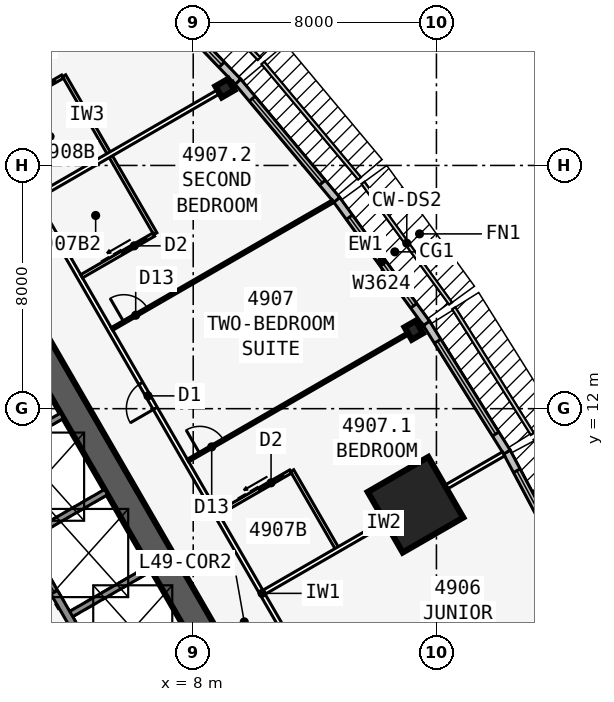
"""IFC4 building model, lengths in metres.
Left out: names, types, materials, properties, quantities, classifications, styles, units other than length and angle.
Written with IfcOpenShell. Run it as: python <this file> out.ifc"""

import sys

from ifc_helpers import new_model, si_unit, direction, frame, frame_2d, origin, origin_2d, place, context, subcontext, project, spatial, rectangle, i_section, extrude, element, fill, save


model = new_model("IFC4")
c1 = context("Model", 3, precision=1e-05, world=origin(), true_north=direction((0.0, 1.0)))
c2 = subcontext(c1, "Body", "Model", "MODEL_VIEW")
j1 = project(units=[si_unit("LENGTHUNIT", "METRE"), si_unit("PLANEANGLEUNIT", "RADIAN")], contexts=[c1])
p1 = place(None, origin())
s1 = spatial("IfcSite", under=j1, at=p1, CompositionType="ELEMENT")
p2 = place(p1, origin())
s2 = spatial("IfcBuilding", under=s1, at=p2, CompositionType="ELEMENT")
p3 = place(p2, frame((0.0, 0.0, 182.7)))
s3 = spatial("IfcBuildingStorey", under=s2, at=p3, CompositionType="ELEMENT", Elevation=182.7)
p4 = place(p3, frame((16.5, -9.526, 0.0), z_axis=(0.0, 0.0, 1.0), x_axis=(-0.499999749417, 0.866025548458, 0.0)))
e1 = element("IfcWall", 1, at=p4, inside=s3, PredefinedType="SHEAR", context=c2, shape_type="SweptSolid", body=[
    extrude(rectangle(XDim=33.0, YDim=0.9, at=frame_2d((16.5, 0.0))), origin(), (0.0, 0.0, 1.0), 3.4),
])
p5 = place(p4, frame((14.15, 0.0, 0.0)))
e2 = element("IfcOpeningElement", 2, at=p5, cuts=e1, PredefinedType="OPENING", context=c2, shape_type="SweptSolid", body=[
    extrude(rectangle(XDim=1.8, YDim=2.13, at=frame_2d((0.9, 1.065))), frame((0.0, 0.46, 0.0), z_axis=(0.0, -1.0, 0.0), x_axis=(1.0, 0.0, 0.0)), (0.0, 0.0, 1.0), 0.92),
])
p6 = place(p4, frame((12.6, 0.0, 0.0)))
e3 = element("IfcOpeningElement", 3, at=p6, cuts=e1, PredefinedType="OPENING", context=c2, shape_type="SweptSolid", body=[
    extrude(rectangle(XDim=1.0, YDim=2.13, at=frame_2d((0.5, 1.065))), frame((0.0, 0.46, 0.0), z_axis=(0.0, -1.0, 0.0), x_axis=(1.0, 0.0, 0.0)), (0.0, 0.0, 1.0), 0.92),
])
p7 = place(p3, frame((5.379, 2.586, 0.0), z_axis=(0.0, 0.0, 1.0), x_axis=(-0.500001375892, 0.866024609411, 0.0)))
e4 = element("IfcWall", 4, at=p7, inside=s3, PredefinedType="SOLIDWALL", context=c2, shape_type="SweptSolid", body=[
    extrude(rectangle(XDim=10.633, YDim=0.25, at=frame_2d((5.316, 0.0))), origin(), (0.0, 0.0, 1.0), 3.235),
])
p8 = place(p7, frame((9.164, 0.0, 0.0)))
e5 = element("IfcOpeningElement", 5, at=p8, cuts=e4, PredefinedType="OPENING", context=c2, shape_type="SweptSolid", body=[
    extrude(rectangle(XDim=0.9, YDim=2.13, at=frame_2d((0.45, 1.065))), frame((0.0, 0.135, 0.0), z_axis=(0.0, -1.0, 0.0), x_axis=(1.0, 0.0, 0.0)), (0.0, 0.0, 1.0), 0.27),
])
p9 = place(p7, frame((1.0, 0.0, 0.0)))
e6 = element("IfcOpeningElement", 6, at=p9, cuts=e4, PredefinedType="OPENING", context=c2, shape_type="SweptSolid", body=[
    extrude(rectangle(XDim=1.1, YDim=2.13, at=frame_2d((0.55, 1.065))), frame((0.0, 0.135, 0.0), z_axis=(0.0, -1.0, 0.0), x_axis=(1.0, 0.0, 0.0)), (0.0, 0.0, 1.0), 0.27),
])
p10 = place(p7, frame((3.9, 0.0, 0.0)))
e7 = element("IfcOpeningElement", 7, at=p10, cuts=e4, PredefinedType="OPENING", context=c2, shape_type="SweptSolid", body=[
    extrude(rectangle(XDim=1.1, YDim=2.13, at=frame_2d((0.55, 1.065))), frame((0.0, 0.135, 0.0), z_axis=(0.0, -1.0, 0.0), x_axis=(1.0, 0.0, 0.0)), (0.0, 0.0, 1.0), 0.27),
])
p11 = place(p7, frame((6.8, 0.0, 0.0)))
e8 = element("IfcOpeningElement", 8, at=p11, cuts=e4, PredefinedType="OPENING", context=c2, shape_type="SweptSolid", body=[
    extrude(rectangle(XDim=1.1, YDim=2.13, at=frame_2d((0.55, 1.065))), frame((0.0, 0.135, 0.0), z_axis=(0.0, -1.0, 0.0), x_axis=(1.0, 0.0, 0.0)), (0.0, 0.0, 1.0), 0.27),
])
for number, where, z_axis, x_axis in (
    (9, (3.879, 5.184, 0.0), (0.0, 0.0, 1.0), (0.866, 0.5, 0.0)),
    (10, (2.429, 7.696, 0.0), (0.0, 0.0, 1.0), (0.866, 0.5, 0.0)),
    (11, (0.979, 10.207, 0.0), (0.0, 0.0, 1.0), (0.866, 0.5, 0.0)),
):
    element("IfcWall", number, at=place(p3, frame(where, z_axis=z_axis, x_axis=x_axis)), inside=s3, PredefinedType="SOLIDWALL", context=c2, shape_type="SweptSolid", body=[
        extrude(rectangle(XDim=3.125, YDim=0.2, at=frame_2d((1.562, 0.0))), origin(), (0.0, 0.0, 1.0), 3.235),
    ])
for number, where, z_axis, x_axis in (
    (12, (15.254, 14.58, 0.0), (0.0, 0.0, 1.0), (0.866, 0.5, 0.0)),
    (13, (9.041, 22.541, 0.0), (0.0, 0.0, 1.0), (-0.5, 0.866, 0.0)),
):
    element("IfcColumn", number, at=place(p3, frame(where, z_axis=z_axis, x_axis=x_axis)), inside=s3, PredefinedType="COLUMN", context=c2, shape_type="SweptSolid", body=[
        extrude(i_section(OverallWidth=0.424, OverallDepth=0.475, WebThickness=0.048, FlangeThickness=0.077, at=origin_2d()), origin(), (0.0, 0.0, 1.0), 3.4),
    ])
p12 = place(p3, frame((15.312, 8.84, 0.0), z_axis=(0.0, 0.0, 1.0), x_axis=(0.866025403784, 0.5, 0.0)))
e14 = element("IfcColumn", 14, at=p12, inside=s3, PredefinedType="COLUMN", context=c2, shape_type="SweptSolid", body=[
    extrude(rectangle(XDim=2.3, YDim=2.3, at=origin_2d()), origin(), (0.0, 0.0, 1.0), 3.4),
])
p13 = place(p3, frame((20.663, 6.161, 0.0), z_axis=(0.0, 0.0, 1.0), x_axis=(-0.469404966864, 0.882982999317, 0.0)))
e15 = element("IfcWall", 15, at=p13, inside=s3, PredefinedType="STANDARD", context=c2, shape_type="SweptSolid", body=[
    extrude(rectangle(XDim=5.003, YDim=0.25, at=frame_2d((2.501, 0.0))), origin(), (0.0, 0.0, 1.0), 3.235),
])
p14 = place(p13, frame((0.701, 0.0, 0.45)))
e16 = element("IfcOpeningElement", 16, at=p14, cuts=e15, PredefinedType="OPENING", context=c2, shape_type="SweptSolid", body=[
    extrude(rectangle(XDim=3.6, YDim=2.4, at=frame_2d((1.8, 1.2))), frame((0.0, 0.135, 0.0), z_axis=(0.0, -1.0, 0.0), x_axis=(1.0, 0.0, 0.0)), (0.0, 0.0, 1.0), 0.27),
])
p15 = place(p3, frame((18.319, 10.571, 0.0), z_axis=(0.0, 0.0, 1.0), x_axis=(-0.529990167382, 0.84800378683, 0.0)))
e17 = element("IfcWall", 17, at=p15, inside=s3, PredefinedType="STANDARD", context=c2, shape_type="SweptSolid", body=[
    extrude(rectangle(XDim=5.003, YDim=0.25, at=frame_2d((2.501, 0.0))), origin(), (0.0, 0.0, 1.0), 3.235),
])
p16 = place(p15, frame((0.701, 0.0, 0.45)))
e18 = element("IfcOpeningElement", 18, at=p16, cuts=e17, PredefinedType="OPENING", context=c2, shape_type="SweptSolid", body=[
    extrude(rectangle(XDim=3.6, YDim=2.4, at=frame_2d((1.8, 1.2))), frame((0.0, 0.135, 0.0), z_axis=(0.0, -1.0, 0.0), x_axis=(1.0, 0.0, 0.0)), (0.0, 0.0, 1.0), 0.27),
])
p17 = place(p3, frame((15.672, 14.807, 0.0), z_axis=(0.0, 0.0, 1.0), x_axis=(-0.587669188412, 0.809101307001, 0.0)))
e19 = element("IfcWall", 19, at=p17, inside=s3, PredefinedType="STANDARD", context=c2, shape_type="SweptSolid", body=[
    extrude(rectangle(XDim=5.028, YDim=0.25, at=frame_2d((2.514, 0.0))), origin(), (0.0, 0.0, 1.0), 3.235),
])
p18 = place(p17, frame((0.714, 0.0, 0.45)))
e20 = element("IfcOpeningElement", 20, at=p18, cuts=e19, PredefinedType="OPENING", context=c2, shape_type="SweptSolid", body=[
    extrude(rectangle(XDim=3.6, YDim=2.4, at=frame_2d((1.8, 1.2))), frame((0.0, 0.135, 0.0), z_axis=(0.0, -1.0, 0.0), x_axis=(1.0, 0.0, 0.0)), (0.0, 0.0, 1.0), 0.27),
])
p19 = place(p3, frame((12.723, 18.868, 0.0), z_axis=(0.0, 0.0, 1.0), x_axis=(-0.641810386606, 0.766863369607, 0.0)))
e21 = element("IfcWall", 21, at=p19, inside=s3, PredefinedType="STANDARD", context=c2, shape_type="SweptSolid", body=[
    extrude(rectangle(XDim=5.076, YDim=0.25, at=frame_2d((2.538, 0.0))), origin(), (0.0, 0.0, 1.0), 3.235),
])
p20 = place(p19, frame((0.738, 0.0, 0.45)))
e22 = element("IfcOpeningElement", 22, at=p20, cuts=e21, PredefinedType="OPENING", context=c2, shape_type="SweptSolid", body=[
    extrude(rectangle(XDim=3.6, YDim=2.4, at=frame_2d((1.8, 1.2))), frame((0.0, 0.135, 0.0), z_axis=(0.0, -1.0, 0.0), x_axis=(1.0, 0.0, 0.0)), (0.0, 0.0, 1.0), 0.27),
])
p21 = place(p3, frame((9.471, 22.754, 0.0), z_axis=(0.0, 0.0, 1.0), x_axis=(-0.691719937936, 0.722165858693, 0.0)))
e23 = element("IfcWall", 23, at=p21, inside=s3, PredefinedType="STANDARD", context=c2, shape_type="SweptSolid", body=[
    extrude(rectangle(XDim=5.148, YDim=0.25, at=frame_2d((2.574, 0.0))), origin(), (0.0, 0.0, 1.0), 3.235),
])
p22 = place(p21, frame((0.774, 0.0, 0.45)))
e24 = element("IfcOpeningElement", 24, at=p22, cuts=e23, PredefinedType="OPENING", context=c2, shape_type="SweptSolid", body=[
    extrude(rectangle(XDim=3.6, YDim=2.4, at=frame_2d((1.8, 1.2))), frame((0.0, 0.135, 0.0), z_axis=(0.0, -1.0, 0.0), x_axis=(1.0, 0.0, 0.0)), (0.0, 0.0, 1.0), 0.27),
])
p23 = place(p3, frame((20.027, -10.985, 0.0), z_axis=(0.0, 0.0, 1.0), x_axis=(-0.500001677587, 0.866024435227, 0.0)))
e25 = element("IfcWall", 25, at=p23, inside=s3, PredefinedType="PARTITIONING", context=c2, shape_type="SweptSolid", body=[
    extrude(rectangle(XDim=39.054, YDim=0.15, at=frame_2d((19.527, 0.0))), origin(), (0.0, 0.0, 1.0), 3.235),
])
p24 = place(p23, frame((1.558, 0.0, 0.0)))
e26 = element("IfcOpeningElement", 26, at=p24, cuts=e25, PredefinedType="OPENING", context=c2, shape_type="SweptSolid", body=[
    extrude(rectangle(XDim=0.95, YDim=2.13, at=frame_2d((0.475, 1.065))), frame((0.0, 0.085, 0.0), z_axis=(0.0, -1.0, 0.0), x_axis=(1.0, 0.0, 0.0)), (0.0, 0.0, 1.0), 0.17),
])
p25 = place(p23, frame((12.752, 0.0, 0.0)))
e27 = element("IfcOpeningElement", 27, at=p25, cuts=e25, PredefinedType="OPENING", context=c2, shape_type="SweptSolid", body=[
    extrude(rectangle(XDim=0.95, YDim=2.13, at=frame_2d((0.475, 1.065))), frame((0.0, 0.085, 0.0), z_axis=(0.0, -1.0, 0.0), x_axis=(1.0, 0.0, 0.0)), (0.0, 0.0, 1.0), 0.17),
])
p26 = place(p23, frame((26.552, 0.0, 0.0)))
e28 = element("IfcOpeningElement", 28, at=p26, cuts=e25, PredefinedType="OPENING", context=c2, shape_type="SweptSolid", body=[
    extrude(rectangle(XDim=0.95, YDim=2.13, at=frame_2d((0.475, 1.065))), frame((0.0, 0.085, 0.0), z_axis=(0.0, -1.0, 0.0), x_axis=(1.0, 0.0, 0.0)), (0.0, 0.0, 1.0), 0.17),
])
p27 = place(p23, frame((37.752, 0.0, 0.0)))
e29 = element("IfcOpeningElement", 29, at=p27, cuts=e25, PredefinedType="OPENING", context=c2, shape_type="SweptSolid", body=[
    extrude(rectangle(XDim=0.95, YDim=2.13, at=frame_2d((0.475, 1.065))), frame((0.0, 0.085, 0.0), z_axis=(0.0, -1.0, 0.0), x_axis=(1.0, 0.0, 0.0)), (0.0, 0.0, 1.0), 0.17),
])
p28 = place(p3, frame((10.329, 5.963, 0.0), z_axis=(0.0, 0.0, 1.0), x_axis=(0.866025170687, 0.500000403736, 0.0)))
e30 = element("IfcWall", 30, at=p28, inside=s3, PredefinedType="PARTITIONING", context=c2, shape_type="SweptSolid", body=[
    extrude(rectangle(XDim=9.099, YDim=0.15, at=frame_2d((4.549, 0.0))), origin(), (0.0, 0.0, 1.0), 2.389),
])
p29 = place(p3, frame((7.829, 10.293, 0.0), z_axis=(0.0, 0.0, 1.0), x_axis=(0.866027015393, 0.499997208602, 0.0)))
e31 = element("IfcWall", 31, at=p29, inside=s3, PredefinedType="PARTITIONING", context=c2, shape_type="SweptSolid", body=[
    extrude(rectangle(XDim=8.922, YDim=0.1, at=frame_2d((4.461, 0.0))), origin(), (0.0, 0.0, 1.0), 2.389),
])
p30 = place(p29, frame((0.45, 0.0, 0.0)))
e32 = element("IfcOpeningElement", 32, at=p30, cuts=e31, PredefinedType="OPENING", context=c2, shape_type="SweptSolid", body=[
    extrude(rectangle(XDim=0.9, YDim=2.13, at=frame_2d((0.45, 1.065))), frame((0.0, 0.06, 0.0), z_axis=(0.0, -1.0, 0.0), x_axis=(1.0, 0.0, 0.0)), (0.0, 0.0, 1.0), 0.12),
])
p31 = place(p3, frame((5.329, 14.623, 0.0), z_axis=(0.0, 0.0, 1.0), x_axis=(0.866011723728, 0.500023693804, 0.0)))
e33 = element("IfcWall", 33, at=p31, inside=s3, PredefinedType="PARTITIONING", context=c2, shape_type="SweptSolid", body=[
    extrude(rectangle(XDim=8.395, YDim=0.1, at=frame_2d((4.198, 0.0))), origin(), (0.0, 0.0, 1.0), 2.389),
])
p32 = place(p31, frame((0.45, 0.0, 0.0)))
e34 = element("IfcOpeningElement", 34, at=p32, cuts=e33, PredefinedType="OPENING", context=c2, shape_type="SweptSolid", body=[
    extrude(rectangle(XDim=0.9, YDim=2.13, at=frame_2d((0.45, 1.065))), frame((0.0, 0.06, 0.0), z_axis=(0.0, -1.0, 0.0), x_axis=(1.0, 0.0, 0.0)), (0.0, 0.0, 1.0), 0.12),
])
p33 = place(p3, frame((2.829, 18.954, 0.0), z_axis=(0.0, 0.0, 1.0), x_axis=(0.866015739374, 0.500016738876, 0.0)))
e35 = element("IfcWall", 35, at=p33, inside=s3, PredefinedType="PARTITIONING", context=c2, shape_type="SweptSolid", body=[
    extrude(rectangle(XDim=7.516, YDim=0.15, at=frame_2d((3.758, 0.0))), origin(), (0.0, 0.0, 1.0), 2.389),
])
p34 = place(p3, frame((12.753, 7.363, 0.0), z_axis=(0.0, 0.0, 1.0), x_axis=(-0.499990139034, 0.866031096941, 0.0)))
e36 = element("IfcWall", 36, at=p34, inside=s3, PredefinedType="PLUMBINGWALL", context=c2, shape_type="SweptSolid", body=[
    extrude(rectangle(XDim=3.0, YDim=0.12, at=frame_2d((1.5, 0.0))), origin(), (0.0, 0.0, 1.0), 3.235),
])
p35 = place(p3, frame((8.829, 8.561, 0.0), z_axis=(0.0, 0.0, 1.0), x_axis=(0.866035715982, 0.499982138324, 0.0)))
e37 = element("IfcWall", 37, at=p35, inside=s3, PredefinedType="PLUMBINGWALL", context=c2, shape_type="SweptSolid", body=[
    extrude(rectangle(XDim=2.74, YDim=0.12, at=frame_2d((1.37, 0.0))), origin(), (0.0, 0.0, 1.0), 3.235),
])
p36 = place(p35, frame((1.55, 0.0, 0.0)))
e38 = element("IfcOpeningElement", 38, at=p36, cuts=e37, PredefinedType="OPENING", context=c2, shape_type="SweptSolid", body=[
    extrude(rectangle(XDim=0.9, YDim=2.13, at=frame_2d((0.45, 1.065))), frame((0.0, 0.07, 0.0), z_axis=(0.0, -1.0, 0.0), x_axis=(1.0, 0.0, 0.0)), (0.0, 0.0, 1.0), 0.14),
])
p37 = place(p3, frame((6.753, 17.755, 0.0), z_axis=(0.0, 0.0, 1.0), x_axis=(-0.499990139034, 0.866031096941, 0.0)))
e39 = element("IfcWall", 39, at=p37, inside=s3, PredefinedType="PLUMBINGWALL", context=c2, shape_type="SweptSolid", body=[
    extrude(rectangle(XDim=3.0, YDim=0.12, at=frame_2d((1.5, 0.0))), origin(), (0.0, 0.0, 1.0), 3.235),
])
p38 = place(p3, frame((4.329, 16.355, 0.0), z_axis=(0.0, 0.0, 1.0), x_axis=(0.866035715982, 0.499982138324, 0.0)))
e40 = element("IfcWall", 40, at=p38, inside=s3, PredefinedType="PLUMBINGWALL", context=c2, shape_type="SweptSolid", body=[
    extrude(rectangle(XDim=2.74, YDim=0.12, at=frame_2d((1.37, 0.0))), origin(), (0.0, 0.0, 1.0), 3.235),
])
p39 = place(p38, frame((1.55, 0.0, 0.0)))
e41 = element("IfcOpeningElement", 41, at=p39, cuts=e40, PredefinedType="OPENING", context=c2, shape_type="SweptSolid", body=[
    extrude(rectangle(XDim=0.9, YDim=2.13, at=frame_2d((0.45, 1.065))), frame((0.0, 0.07, 0.0), z_axis=(0.0, -1.0, 0.0), x_axis=(1.0, 0.0, 0.0)), (0.0, 0.0, 1.0), 0.14),
])
p40 = place(p3, frame((5.253, 20.354, 0.0), z_axis=(0.0, 0.0, 1.0), x_axis=(-0.499990139034, 0.866031096941, 0.0)))
e42 = element("IfcWall", 42, at=p40, inside=s3, PredefinedType="PLUMBINGWALL", context=c2, shape_type="SweptSolid", body=[
    extrude(rectangle(XDim=3.0, YDim=0.12, at=frame_2d((1.5, 0.0))), origin(), (0.0, 0.0, 1.0), 3.235),
])
p41 = place(p3, frame((1.329, 21.552, 0.0), z_axis=(0.0, 0.0, 1.0), x_axis=(0.865997131366, 0.500048966069, 0.0)))
e43 = element("IfcWall", 43, at=p41, inside=s3, PredefinedType="PLUMBINGWALL", context=c2, shape_type="SweptSolid", body=[
    extrude(rectangle(XDim=2.74, YDim=0.12, at=frame_2d((1.37, 0.0))), origin(), (0.0, 0.0, 1.0), 3.235),
])
p42 = place(p41, frame((1.55, 0.0, 0.0)))
e44 = element("IfcOpeningElement", 44, at=p42, cuts=e43, PredefinedType="OPENING", context=c2, shape_type="SweptSolid", body=[
    extrude(rectangle(XDim=0.9, YDim=2.13, at=frame_2d((0.45, 1.065))), frame((0.0, 0.07, 0.0), z_axis=(0.0, -1.0, 0.0), x_axis=(1.0, 0.0, 0.0)), (0.0, 0.0, 1.0), 0.14),
])
p43 = place(p14, origin())
e45 = element("IfcWindow", 45, at=p43, inside=s3, PartitioningType="SINGLE_PANEL", PredefinedType="WINDOW", context=c2, shape_type="SweptSolid", body=[
    extrude(rectangle(XDim=3.6, YDim=2.4, at=frame_2d((1.8, 1.2))), frame((0.0, 0.03, 0.0), z_axis=(0.0, -1.0, 0.0), x_axis=(1.0, 0.0, 0.0)), (0.0, 0.0, 1.0), 0.06),
])
fill(e16, e45)
p44 = place(p16, origin())
e46 = element("IfcWindow", 46, at=p44, inside=s3, PartitioningType="SINGLE_PANEL", PredefinedType="WINDOW", context=c2, shape_type="SweptSolid", body=[
    extrude(rectangle(XDim=3.6, YDim=2.4, at=frame_2d((1.8, 1.2))), frame((0.0, 0.03, 0.0), z_axis=(0.0, -1.0, 0.0), x_axis=(1.0, 0.0, 0.0)), (0.0, 0.0, 1.0), 0.06),
])
fill(e18, e46)
p45 = place(p18, origin())
e47 = element("IfcWindow", 47, at=p45, inside=s3, PartitioningType="SINGLE_PANEL", PredefinedType="WINDOW", context=c2, shape_type="SweptSolid", body=[
    extrude(rectangle(XDim=3.6, YDim=2.4, at=frame_2d((1.8, 1.2))), frame((0.0, 0.03, 0.0), z_axis=(0.0, -1.0, 0.0), x_axis=(1.0, 0.0, 0.0)), (0.0, 0.0, 1.0), 0.06),
])
fill(e20, e47)
p46 = place(p20, origin())
e48 = element("IfcWindow", 48, at=p46, inside=s3, PartitioningType="SINGLE_PANEL", PredefinedType="WINDOW", context=c2, shape_type="SweptSolid", body=[
    extrude(rectangle(XDim=3.6, YDim=2.4, at=frame_2d((1.8, 1.2))), frame((0.0, 0.03, 0.0), z_axis=(0.0, -1.0, 0.0), x_axis=(1.0, 0.0, 0.0)), (0.0, 0.0, 1.0), 0.06),
])
fill(e22, e48)
p47 = place(p22, origin())
e49 = element("IfcWindow", 49, at=p47, inside=s3, PartitioningType="SINGLE_PANEL", PredefinedType="WINDOW", context=c2, shape_type="SweptSolid", body=[
    extrude(rectangle(XDim=3.6, YDim=2.4, at=frame_2d((1.8, 1.2))), frame((0.0, 0.03, 0.0), z_axis=(0.0, -1.0, 0.0), x_axis=(1.0, 0.0, 0.0)), (0.0, 0.0, 1.0), 0.06),
])
fill(e24, e49)
p48 = place(p30, origin())
e50 = element("IfcDoor", 50, at=p48, inside=s3, OperationType="SINGLE_SWING_LEFT", PredefinedType="DOOR", context=c2, shape_type="SweptSolid", body=[
    extrude(rectangle(XDim=0.9, YDim=2.13, at=frame_2d((0.45, 1.065))), frame((0.0, 0.025, 0.0), z_axis=(0.0, -1.0, 0.0), x_axis=(1.0, 0.0, 0.0)), (0.0, 0.0, 1.0), 0.05),
])
fill(e32, e50)
p49 = place(p32, origin())
e51 = element("IfcDoor", 51, at=p49, inside=s3, OperationType="SINGLE_SWING_LEFT", PredefinedType="DOOR", context=c2, shape_type="SweptSolid", body=[
    extrude(rectangle(XDim=0.9, YDim=2.13, at=frame_2d((0.45, 1.065))), frame((0.0, 0.025, 0.0), z_axis=(0.0, -1.0, 0.0), x_axis=(1.0, 0.0, 0.0)), (0.0, 0.0, 1.0), 0.05),
])
fill(e34, e51)
p50 = place(p36, origin())
e52 = element("IfcDoor", 52, at=p50, inside=s3, OperationType="SLIDING_TO_LEFT", PredefinedType="DOOR", context=c2, shape_type="SweptSolid", body=[
    extrude(rectangle(XDim=0.9, YDim=2.13, at=frame_2d((0.45, 1.065))), frame((0.0, 0.025, 0.0), z_axis=(0.0, -1.0, 0.0), x_axis=(1.0, 0.0, 0.0)), (0.0, 0.0, 1.0), 0.05),
])
fill(e38, e52)
p51 = place(p26, origin())
e53 = element("IfcDoor", 53, at=p51, inside=s3, OperationType="SINGLE_SWING_LEFT", PredefinedType="DOOR", context=c2, shape_type="SweptSolid", body=[
    extrude(rectangle(XDim=0.95, YDim=2.13, at=frame_2d((0.475, 1.065))), frame((0.0, 0.025, 0.0), z_axis=(0.0, -1.0, 0.0), x_axis=(1.0, 0.0, 0.0)), (0.0, 0.0, 1.0), 0.05),
])
fill(e28, e53)
p52 = place(p39, origin())
e54 = element("IfcDoor", 54, at=p52, inside=s3, OperationType="SLIDING_TO_LEFT", PredefinedType="DOOR", context=c2, shape_type="SweptSolid", body=[
    extrude(rectangle(XDim=0.9, YDim=2.13, at=frame_2d((0.45, 1.065))), frame((0.0, 0.025, 0.0), z_axis=(0.0, -1.0, 0.0), x_axis=(1.0, 0.0, 0.0)), (0.0, 0.0, 1.0), 0.05),
])
fill(e41, e54)
p53 = place(p42, origin())
e55 = element("IfcDoor", 55, at=p53, inside=s3, OperationType="SLIDING_TO_LEFT", PredefinedType="DOOR", context=c2, shape_type="SweptSolid", body=[
    extrude(rectangle(XDim=0.9, YDim=2.13, at=frame_2d((0.45, 1.065))), frame((0.0, 0.025, 0.0), z_axis=(0.0, -1.0, 0.0), x_axis=(1.0, 0.0, 0.0)), (0.0, 0.0, 1.0), 0.05),
])
fill(e44, e55)
p54 = place(p10, origin())
e56 = element("IfcDoor", 56, at=p54, inside=s3, OperationType="DOUBLE_DOOR_SLIDING", PredefinedType="USERDEFINED", context=c2, shape_type="SweptSolid", body=[
    extrude(rectangle(XDim=1.1, YDim=2.13, at=frame_2d((0.55, 1.065))), frame((0.0, 0.025, 0.0), z_axis=(0.0, -1.0, 0.0), x_axis=(1.0, 0.0, 0.0)), (0.0, 0.0, 1.0), 0.05),
])
fill(e7, e56)
save(model, sys.argv[1])
